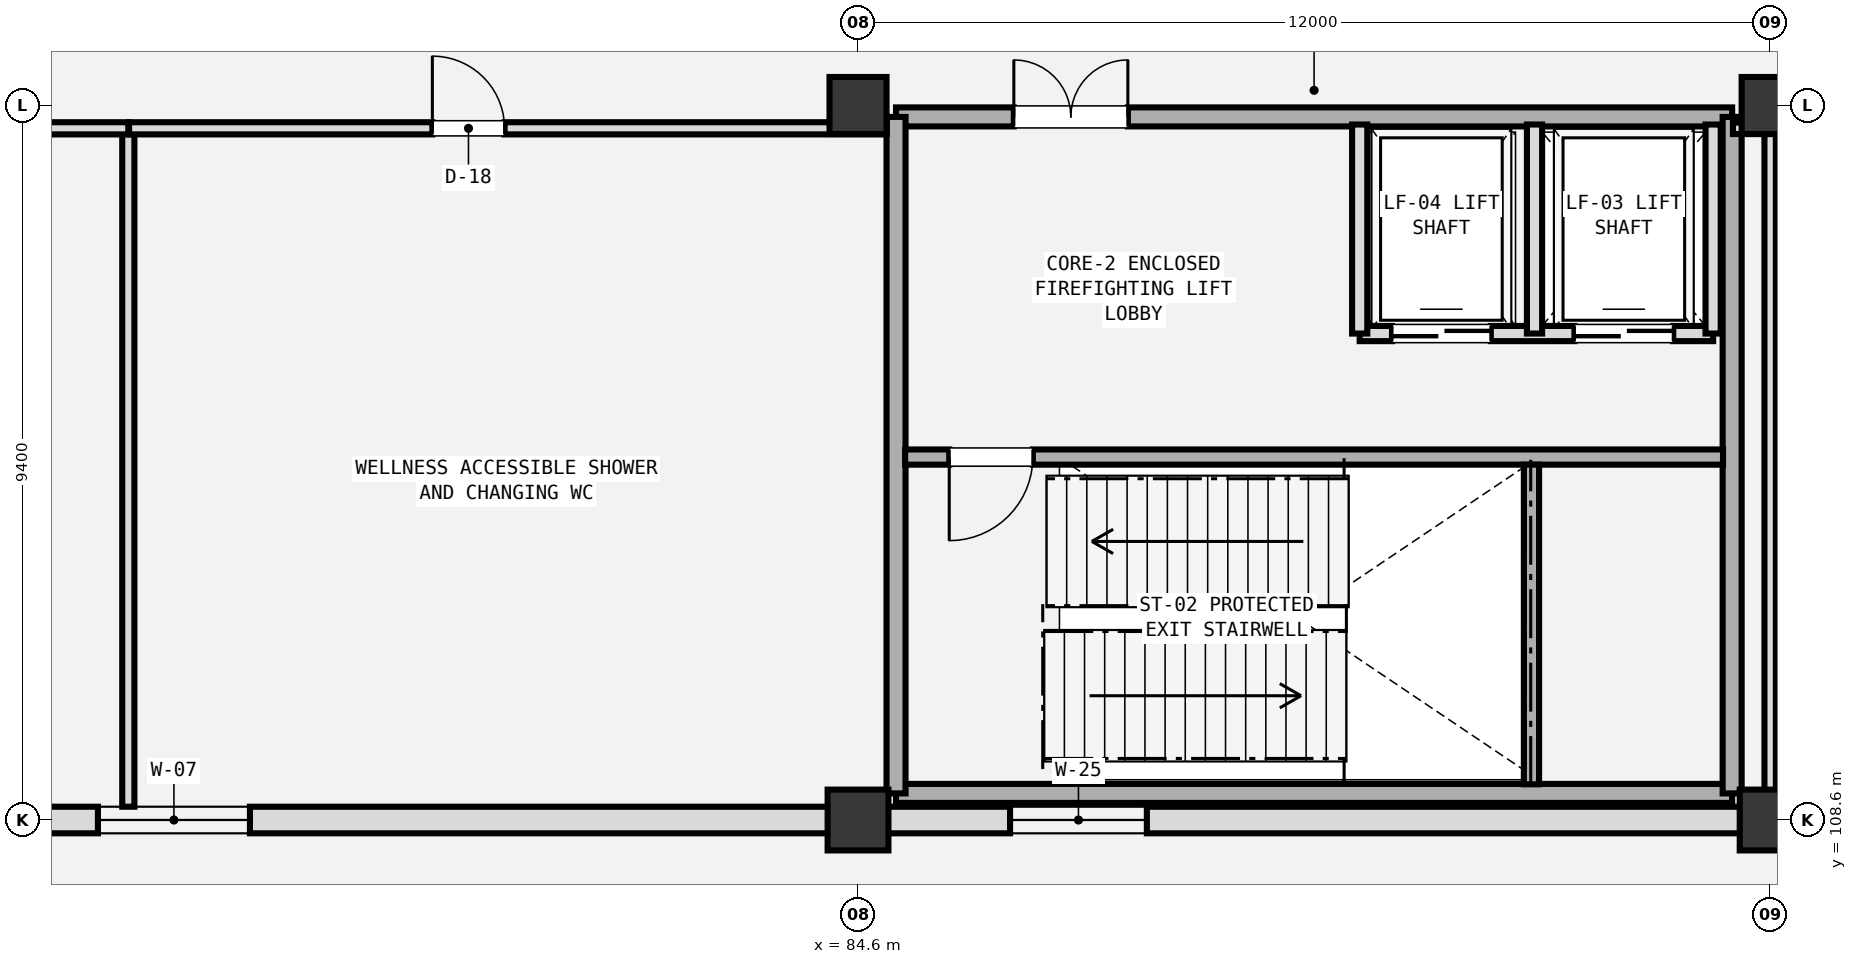
"""IFC4 building model, lengths in metres.
Left out: names, types, materials, properties, quantities, classifications, styles, units other than length and angle.
Written with IfcOpenShell. Run it as: python <this file> out.ifc"""

import sys

from ifc_helpers import new_model, si_unit, direction, frame, frame_2d, origin, origin_2d, place, context, subcontext, project, spatial, rectangle, extrude, element, fill, save


model = new_model("IFC4")
c1 = context("Model", 3, precision=1e-05, world=origin(), true_north=direction((0.0, 1.0)))
c2 = subcontext(c1, "Body", "Model", "MODEL_VIEW")
j1 = project(units=[si_unit("LENGTHUNIT", "METRE"), si_unit("PLANEANGLEUNIT", "RADIAN")], contexts=[c1])
p1 = place(None, origin())
s1 = spatial("IfcSite", under=j1, at=p1, CompositionType="ELEMENT")
p2 = place(p1, origin())
s2 = spatial("IfcBuilding", under=s1, at=p2, CompositionType="ELEMENT")
p3 = place(p2, origin())
s3 = spatial("IfcBuildingStorey", under=s2, at=p3, CompositionType="ELEMENT", Elevation=0.0)
p4 = place(p3, frame((84.6, 108.6, 0.0), z_axis=(0.0, 0.0, 1.0), x_axis=(1.0, 0.0, 0.0)))
e1 = element("IfcColumn", 1, at=p4, inside=s3, PredefinedType="COLUMN", context=c2, shape_type="SweptSolid", body=[
    extrude(rectangle(XDim=0.8, YDim=0.8, at=origin_2d()), origin(), (0.0, 0.0, 1.0), 5.4),
])
p5 = place(p3, frame((84.6, 118.0, 0.0), z_axis=(0.0, 0.0, 1.0), x_axis=(1.0, 0.0, 0.0)))
e2 = element("IfcColumn", 2, at=p5, inside=s3, PredefinedType="COLUMN", context=c2, shape_type="SweptSolid", body=[
    extrude(rectangle(XDim=0.75, YDim=0.75, at=origin_2d()), origin(), (0.0, 0.0, 1.0), 5.4),
])
p6 = place(p3, frame((96.6, 108.6, 0.0), z_axis=(0.0, 0.0, 1.0), x_axis=(1.0, 0.0, 0.0)))
e3 = element("IfcColumn", 3, at=p6, inside=s3, PredefinedType="COLUMN", context=c2, shape_type="SweptSolid", body=[
    extrude(rectangle(XDim=0.8, YDim=0.8, at=origin_2d()), origin(), (0.0, 0.0, 1.0), 5.4),
])
p7 = place(p3, frame((96.6, 118.0, 0.0), z_axis=(0.0, 0.0, 1.0), x_axis=(1.0, 0.0, 0.0)))
e4 = element("IfcColumn", 4, at=p7, inside=s3, PredefinedType="COLUMN", context=c2, shape_type="SweptSolid", body=[
    extrude(rectangle(XDim=0.75, YDim=0.75, at=origin_2d()), origin(), (0.0, 0.0, 1.0), 5.4),
])
p8 = place(p3, frame((60.6, 108.6, 0.0), z_axis=(0.0, 0.0, 1.0), x_axis=(1.0, 0.0, 0.0)))
e5 = element("IfcWall", 5, at=p8, inside=s3, PredefinedType="SOLIDWALL", context=c2, shape_type="SweptSolid", body=[
    extrude(rectangle(XDim=95.4, YDim=0.35, at=frame_2d((47.7, 0.0))), origin(), (0.0, 0.0, 1.0), 4.53),
])
p9 = place(p8, frame((42.0, 0.0, 0.0)))
e6 = element("IfcOpeningElement", 6, at=p9, cuts=e5, PredefinedType="OPENING", context=c2, shape_type="SweptSolid", body=[
    extrude(rectangle(XDim=3.8, YDim=3.6, at=frame_2d((1.9, 1.8))), frame((0.0, 0.185, 0.0), z_axis=(0.0, -1.0, 0.0), x_axis=(1.0, 0.0, 0.0)), (0.0, 0.0, 1.0), 0.37),
])
p10 = place(p8, frame((84.6, 0.0, 0.0)))
e7 = element("IfcOpeningElement", 7, at=p10, cuts=e5, PredefinedType="OPENING", context=c2, shape_type="SweptSolid", body=[
    extrude(rectangle(XDim=1.8, YDim=2.3, at=frame_2d((0.9, 1.15))), frame((0.0, 0.185, 0.0), z_axis=(0.0, -1.0, 0.0), x_axis=(1.0, 0.0, 0.0)), (0.0, 0.0, 1.0), 0.37),
])
p11 = place(p8, frame((4.0, 0.0, 0.9)))
e8 = element("IfcOpeningElement", 8, at=p11, cuts=e5, PredefinedType="OPENING", context=c2, shape_type="SweptSolid", body=[
    extrude(rectangle(XDim=2.4, YDim=1.2, at=frame_2d((1.2, 0.6))), frame((0.0, 0.185, 0.0), z_axis=(0.0, -1.0, 0.0), x_axis=(1.0, 0.0, 0.0)), (0.0, 0.0, 1.0), 0.37),
])
p12 = place(p8, frame((14.0, 0.0, 0.9)))
e9 = element("IfcOpeningElement", 9, at=p12, cuts=e5, PredefinedType="OPENING", context=c2, shape_type="SweptSolid", body=[
    extrude(rectangle(XDim=2.0, YDim=1.2, at=frame_2d((1.0, 0.6))), frame((0.0, 0.185, 0.0), z_axis=(0.0, -1.0, 0.0), x_axis=(1.0, 0.0, 0.0)), (0.0, 0.0, 1.0), 0.37),
])
p13 = place(p8, frame((26.0, 0.0, 0.9)))
e10 = element("IfcOpeningElement", 10, at=p13, cuts=e5, PredefinedType="OPENING", context=c2, shape_type="SweptSolid", body=[
    extrude(rectangle(XDim=1.8, YDim=1.65, at=frame_2d((0.9, 0.825))), frame((0.0, 0.185, 0.0), z_axis=(0.0, -1.0, 0.0), x_axis=(1.0, 0.0, 0.0)), (0.0, 0.0, 1.0), 0.37),
])
p14 = place(p8, frame((54.0, 0.0, 0.9)))
e11 = element("IfcOpeningElement", 11, at=p14, cuts=e5, PredefinedType="OPENING", context=c2, shape_type="SweptSolid", body=[
    extrude(rectangle(XDim=1.35, YDim=1.65, at=frame_2d((0.675, 0.825))), frame((0.0, 0.185, 0.0), z_axis=(0.0, -1.0, 0.0), x_axis=(1.0, 0.0, 0.0)), (0.0, 0.0, 1.0), 0.37),
])
p15 = place(p8, frame((66.0, 0.0, 0.9)))
e12 = element("IfcOpeningElement", 12, at=p15, cuts=e5, PredefinedType="OPENING", context=c2, shape_type="SweptSolid", body=[
    extrude(rectangle(XDim=0.9, YDim=1.5, at=frame_2d((0.45, 0.75))), frame((0.0, 0.185, 0.0), z_axis=(0.0, -1.0, 0.0), x_axis=(1.0, 0.0, 0.0)), (0.0, 0.0, 1.0), 0.37),
])
p16 = place(p3, frame((85.1, 108.95, 0.0), z_axis=(0.0, 0.0, 1.0), x_axis=(1.0, 0.0, 0.0)))
e13 = element("IfcWall", 13, at=p16, inside=s3, PredefinedType="SHEAR", context=c2, shape_type="SweptSolid", body=[
    extrude(rectangle(XDim=11.0, YDim=0.25, at=frame_2d((5.5, 0.0))), origin(), (0.0, 0.0, 1.0), 5.08),
])
p17 = place(p3, frame((85.1, 117.85, 0.0), z_axis=(0.0, 0.0, 1.0), x_axis=(1.0, 0.0, 0.0)))
e14 = element("IfcWall", 14, at=p17, inside=s3, PredefinedType="SHEAR", context=c2, shape_type="SweptSolid", body=[
    extrude(rectangle(XDim=11.0, YDim=0.25, at=frame_2d((5.5, 0.0))), origin(), (0.0, 0.0, 1.0), 5.08),
])
p18 = place(p17, frame((1.55, 0.0, 0.0)))
e15 = element("IfcOpeningElement", 15, at=p18, cuts=e14, PredefinedType="OPENING", context=c2, shape_type="SweptSolid", body=[
    extrude(rectangle(XDim=1.5, YDim=2.2, at=frame_2d((0.75, 1.1))), frame((0.0, 0.135, 0.0), z_axis=(0.0, -1.0, 0.0), x_axis=(1.0, 0.0, 0.0)), (0.0, 0.0, 1.0), 0.27),
])
for number, where, z_axis, x_axis in (
    (16, (85.1, 108.95, 0.0), (0.0, 0.0, 1.0), (0.0, 1.0, 0.0)),
    (17, (96.1, 108.95, 0.0), (0.0, 0.0, 1.0), (0.0, 1.0, 0.0)),
):
    element("IfcWall", number, at=place(p3, frame(where, z_axis=z_axis, x_axis=x_axis)), inside=s3, PredefinedType="SHEAR", context=c2, shape_type="SweptSolid", body=[
        extrude(rectangle(XDim=8.9, YDim=0.25, at=frame_2d((4.45, 0.0))), origin(), (0.0, 0.0, 1.0), 5.08),
    ])
p19 = place(p3, frame((85.22, 113.375, 0.0), z_axis=(0.0, 0.0, 1.0), x_axis=(1.0, 0.0, 0.0)))
e18 = element("IfcWall", 18, at=p19, inside=s3, PredefinedType="SHEAR", context=c2, shape_type="SweptSolid", body=[
    extrude(rectangle(XDim=10.76, YDim=0.2, at=frame_2d((5.38, 0.0))), origin(), (0.0, 0.0, 1.0), 5.08),
])
p20 = place(p19, frame((0.58, 0.0, 0.0)))
e19 = element("IfcOpeningElement", 19, at=p20, cuts=e18, PredefinedType="OPENING", context=c2, shape_type="SweptSolid", body=[
    extrude(rectangle(XDim=1.1, YDim=2.2, at=frame_2d((0.55, 1.1))), frame((0.0, 0.11, 0.0), z_axis=(0.0, -1.0, 0.0), x_axis=(1.0, 0.0, 0.0)), (0.0, 0.0, 1.0), 0.22),
])
p21 = place(p3, frame((93.46, 109.07, 0.0), z_axis=(0.0, 0.0, 1.0), x_axis=(0.0, 1.0, 0.0)))
e20 = element("IfcWall", 20, at=p21, inside=s3, PredefinedType="SHEAR", context=c2, shape_type="SweptSolid", body=[
    extrude(rectangle(XDim=4.205, YDim=0.2, at=frame_2d((2.103, 0.0))), origin(), (0.0, 0.0, 1.0), 5.08),
])
p22 = place(p3, frame((91.2, 115.0, 0.0), z_axis=(0.0, 0.0, 1.0), x_axis=(1.0, 0.0, 0.0)))
e21 = element("IfcWall", 21, at=p22, inside=s3, PredefinedType="SOLIDWALL", context=c2, shape_type="SweptSolid", body=[
    extrude(rectangle(XDim=4.65, YDim=0.2, at=frame_2d((2.325, 0.0))), origin(), (0.0, 0.0, 1.0), 4.72),
])
p23 = place(p22, frame((2.825, 0.0, 0.0)))
e22 = element("IfcOpeningElement", 22, at=p23, cuts=e21, PredefinedType="OPENING", context=c2, shape_type="SweptSolid", body=[
    extrude(rectangle(XDim=1.3, YDim=2.3, at=frame_2d((0.65, 1.15))), frame((0.0, 0.11, 0.0), z_axis=(0.0, -1.0, 0.0), x_axis=(1.0, 0.0, 0.0)), (0.0, 0.0, 1.0), 0.22),
])
p24 = place(p22, frame((0.425, 0.0, 0.0)))
e23 = element("IfcOpeningElement", 23, at=p24, cuts=e21, PredefinedType="OPENING", context=c2, shape_type="SweptSolid", body=[
    extrude(rectangle(XDim=1.3, YDim=2.3, at=frame_2d((0.65, 1.15))), frame((0.0, 0.11, 0.0), z_axis=(0.0, -1.0, 0.0), x_axis=(1.0, 0.0, 0.0)), (0.0, 0.0, 1.0), 0.22),
])
for number, where, z_axis, x_axis in (
    (24, (93.5, 115.0, 0.0), (0.0, 0.0, 1.0), (0.0, 1.0, 0.0)),
    (25, (95.85, 115.0, 0.0), (0.0, 0.0, 1.0), (0.0, 1.0, 0.0)),
    (26, (91.2, 115.0, 0.0), (0.0, 0.0, 1.0), (0.0, 1.0, 0.0)),
):
    element("IfcWall", number, at=place(p3, frame(where, z_axis=z_axis, x_axis=x_axis)), inside=s3, PredefinedType="SOLIDWALL", context=c2, shape_type="SweptSolid", body=[
        extrude(rectangle(XDim=2.75, YDim=0.2, at=frame_2d((1.375, 0.0))), origin(), (0.0, 0.0, 1.0), 5.08),
    ])
p25 = place(p3, frame((75.0, 108.775, 0.0), z_axis=(0.0, 0.0, 1.0), x_axis=(0.0, 1.0, 0.0)))
e27 = element("IfcWall", 27, at=p25, inside=s3, PredefinedType="PLUMBINGWALL", context=c2, shape_type="SweptSolid", body=[
    extrude(rectangle(XDim=8.925, YDim=0.16, at=frame_2d((4.462, 0.0))), origin(), (0.0, 0.0, 1.0), 3.9),
])
p26 = place(p3, frame((67.61, 117.7, 0.0), z_axis=(0.0, 0.0, 1.0), x_axis=(1.0, 0.0, 0.0)))
e28 = element("IfcWall", 28, at=p26, inside=s3, PredefinedType="PLUMBINGWALL", context=c2, shape_type="SweptSolid", body=[
    extrude(rectangle(XDim=7.39, YDim=0.16, at=frame_2d((3.695, 0.0))), origin(), (0.0, 0.0, 1.0), 3.9),
])
p27 = place(p26, frame((2.99, 0.0, 0.0)))
e29 = element("IfcOpeningElement", 29, at=p27, cuts=e28, PredefinedType="OPENING", context=c2, shape_type="SweptSolid", body=[
    extrude(rectangle(XDim=0.95, YDim=2.15, at=frame_2d((0.475, 1.075))), frame((0.0, 0.09, 0.0), z_axis=(0.0, -1.0, 0.0), x_axis=(1.0, 0.0, 0.0)), (0.0, 0.0, 1.0), 0.18),
])
p28 = place(p3, frame((75.01, 117.7, 0.0), z_axis=(0.0, 0.0, 1.0), x_axis=(1.0, 0.0, 0.0)))
e30 = element("IfcWall", 30, at=p28, inside=s3, PredefinedType="PLUMBINGWALL", context=c2, shape_type="SweptSolid", body=[
    extrude(rectangle(XDim=9.965, YDim=0.16, at=frame_2d((4.982, 0.0))), origin(), (0.0, 0.0, 1.0), 3.9),
])
p29 = place(p28, frame((3.99, 0.0, 0.0)))
e31 = element("IfcOpeningElement", 31, at=p29, cuts=e30, PredefinedType="OPENING", context=c2, shape_type="SweptSolid", body=[
    extrude(rectangle(XDim=0.95, YDim=2.15, at=frame_2d((0.475, 1.075))), frame((0.0, 0.09, 0.0), z_axis=(0.0, -1.0, 0.0), x_axis=(1.0, 0.0, 0.0)), (0.0, 0.0, 1.0), 0.18),
])
p30 = place(p3, frame((96.6, 108.775, 0.0), z_axis=(0.0, 0.0, 1.0), x_axis=(0.0, 1.0, 0.0)))
e32 = element("IfcWall", 32, at=p30, inside=s3, PredefinedType="PARTITIONING", context=c2, shape_type="SweptSolid", body=[
    extrude(rectangle(XDim=8.925, YDim=0.15, at=frame_2d((4.462, 0.0))), origin(), (0.0, 0.0, 1.0), 3.9),
])
p31 = place(p3, frame((96.11, 117.7, 0.0), z_axis=(0.0, 0.0, 1.0), x_axis=(1.0, 0.0, 0.0)))
e33 = element("IfcWall", 33, at=p31, inside=s3, PredefinedType="PARTITIONING", context=c2, shape_type="SweptSolid", body=[
    extrude(rectangle(XDim=48.29, YDim=0.15, at=frame_2d((24.145, 0.0))), origin(), (0.0, 0.0, 1.0), 3.9),
])
p32 = place(p31, frame((7.84, 0.0, 0.0)))
e34 = element("IfcOpeningElement", 34, at=p32, cuts=e33, PredefinedType="OPENING", context=c2, shape_type="SweptSolid", body=[
    extrude(rectangle(XDim=1.8, YDim=2.4, at=frame_2d((0.9, 1.2))), frame((0.0, 0.085, 0.0), z_axis=(0.0, -1.0, 0.0), x_axis=(1.0, 0.0, 0.0)), (0.0, 0.0, 1.0), 0.17),
])
p33 = place(p12, frame((2.0, 0.0, 0.0), z_axis=(0.0, 0.0, 1.0), x_axis=(-1.0, 0.0, 0.0)))
e35 = element("IfcWindow", 35, at=p33, inside=s3, PartitioningType="DOUBLE_PANEL_VERTICAL", PredefinedType="WINDOW", context=c2, shape_type="SweptSolid", body=[
    extrude(rectangle(XDim=2.0, YDim=1.2, at=frame_2d((1.0, 0.6))), frame((0.0, 0.03, 0.0), z_axis=(0.0, -1.0, 0.0), x_axis=(1.0, 0.0, 0.0)), (0.0, 0.0, 1.0), 0.06),
])
fill(e9, e35)
p34 = place(p13, frame((1.8, 0.0, 0.0), z_axis=(0.0, 0.0, 1.0), x_axis=(-1.0, 0.0, 0.0)))
e36 = element("IfcWindow", 36, at=p34, inside=s3, PartitioningType="SINGLE_PANEL", PredefinedType="WINDOW", context=c2, shape_type="SweptSolid", body=[
    extrude(rectangle(XDim=1.8, YDim=1.65, at=frame_2d((0.9, 0.825))), frame((0.0, 0.03, 0.0), z_axis=(0.0, -1.0, 0.0), x_axis=(1.0, 0.0, 0.0)), (0.0, 0.0, 1.0), 0.06),
])
fill(e10, e36)
p35 = place(p18, origin())
e37 = element("IfcDoor", 37, at=p35, inside=s3, OperationType="DOUBLE_DOOR_SINGLE_SWING", PredefinedType="DOOR", context=c2, shape_type="SweptSolid", body=[
    extrude(rectangle(XDim=1.5, YDim=2.2, at=frame_2d((0.75, 1.1))), frame((0.0, 0.025, 0.0), z_axis=(0.0, -1.0, 0.0), x_axis=(1.0, 0.0, 0.0)), (0.0, 0.0, 1.0), 0.05),
])
fill(e15, e37)
p36 = place(p20, frame((1.1, 0.0, 0.0), z_axis=(0.0, 0.0, 1.0), x_axis=(-1.0, 0.0, 0.0)))
e38 = element("IfcDoor", 38, at=p36, inside=s3, OperationType="SINGLE_SWING_RIGHT", PredefinedType="DOOR", context=c2, shape_type="SweptSolid", body=[
    extrude(rectangle(XDim=1.1, YDim=2.2, at=frame_2d((0.55, 1.1))), frame((0.0, 0.025, 0.0), z_axis=(0.0, -1.0, 0.0), x_axis=(1.0, 0.0, 0.0)), (0.0, 0.0, 1.0), 0.05),
])
fill(e19, e38)
p37 = place(p23, frame((1.3, 0.0, 0.0), z_axis=(0.0, 0.0, 1.0), x_axis=(-1.0, 0.0, 0.0)))
e39 = element("IfcDoor", 39, at=p37, inside=s3, OperationType="DOUBLE_DOOR_SLIDING", PredefinedType="DOOR", context=c2, shape_type="SweptSolid", body=[
    extrude(rectangle(XDim=1.3, YDim=2.3, at=frame_2d((0.65, 1.15))), frame((0.0, 0.025, 0.0), z_axis=(0.0, -1.0, 0.0), x_axis=(1.0, 0.0, 0.0)), (0.0, 0.0, 1.0), 0.05),
])
fill(e22, e39)
p38 = place(p24, frame((1.3, 0.0, 0.0), z_axis=(0.0, 0.0, 1.0), x_axis=(-1.0, 0.0, 0.0)))
e40 = element("IfcDoor", 40, at=p38, inside=s3, OperationType="DOUBLE_DOOR_SLIDING", PredefinedType="DOOR", context=c2, shape_type="SweptSolid", body=[
    extrude(rectangle(XDim=1.3, YDim=2.3, at=frame_2d((0.65, 1.15))), frame((0.0, 0.025, 0.0), z_axis=(0.0, -1.0, 0.0), x_axis=(1.0, 0.0, 0.0)), (0.0, 0.0, 1.0), 0.05),
])
fill(e23, e40)
p39 = place(p29, origin())
e41 = element("IfcDoor", 41, at=p39, inside=s3, OperationType="SINGLE_SWING_LEFT", PredefinedType="DOOR", context=c2, shape_type="SweptSolid", body=[
    extrude(rectangle(XDim=0.95, YDim=2.15, at=frame_2d((0.475, 1.075))), frame((0.0, 0.025, 0.0), z_axis=(0.0, -1.0, 0.0), x_axis=(1.0, 0.0, 0.0)), (0.0, 0.0, 1.0), 0.05),
])
fill(e31, e41)
save(model, sys.argv[1])
